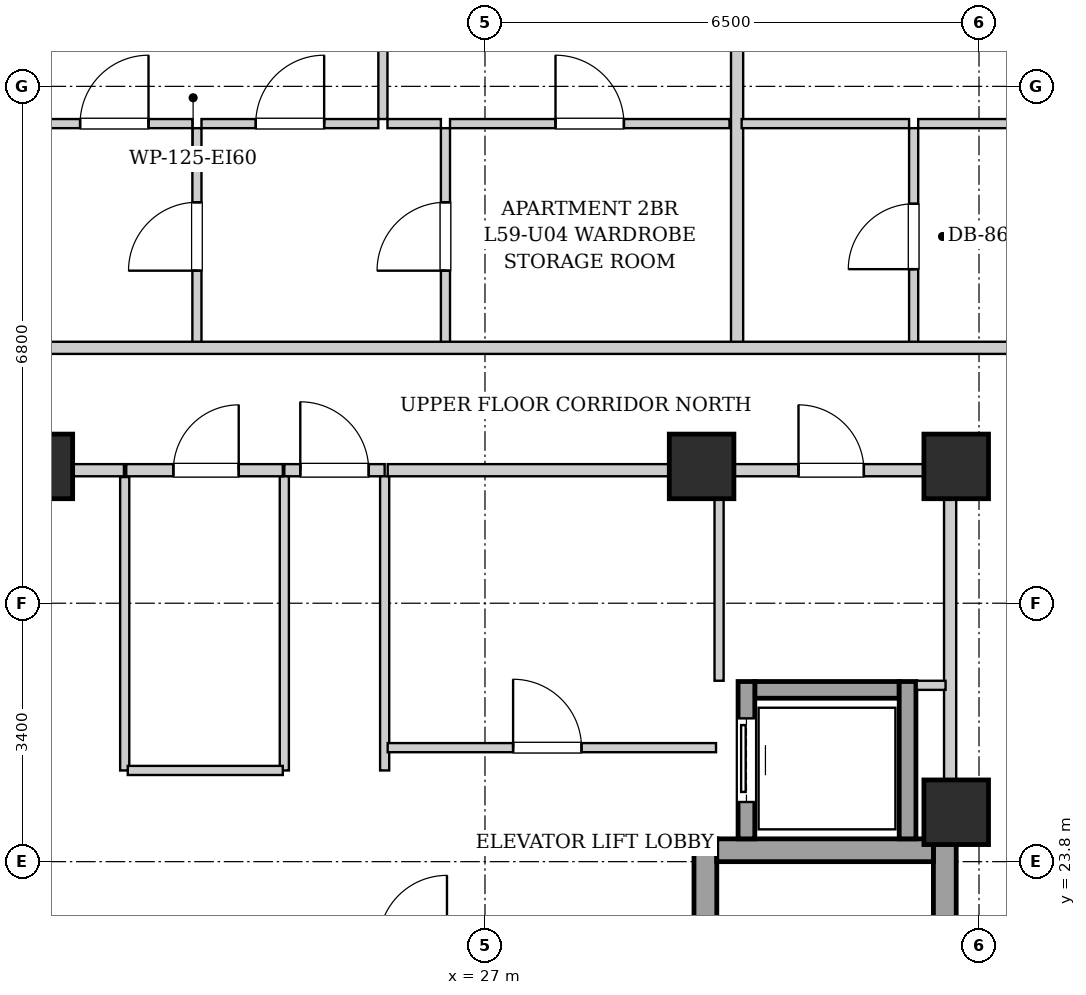
"""IFC4 building model, lengths in metres.
Left out: names, types, materials, properties, quantities, classifications, styles, units other than length and angle.
Written with IfcOpenShell. Run it as: python <this file> out.ifc"""

import sys

from ifc_helpers import new_model, si_unit, direction, frame, frame_2d, origin, origin_2d, place, context, subcontext, project, spatial, rectangle, extrude, element, fill, save


model = new_model("IFC4")
c1 = context("Model", 3, precision=1e-05, world=origin(), true_north=direction((0.0, 1.0)))
c2 = subcontext(c1, "Body", "Model", "MODEL_VIEW")
j1 = project(units=[si_unit("LENGTHUNIT", "METRE"), si_unit("PLANEANGLEUNIT", "RADIAN")], contexts=[c1])
p1 = place(None, origin())
s1 = spatial("IfcSite", under=j1, at=p1, CompositionType="ELEMENT")
p2 = place(p1, origin())
s2 = spatial("IfcBuilding", under=s1, at=p2, CompositionType="ELEMENT")
p3 = place(p2, frame((0.0, 0.0, 204.1)))
s3 = spatial("IfcBuildingStorey", under=s2, at=p3, CompositionType="ELEMENT", Elevation=204.1)
for number, where, z_axis, x_axis in (
    (1, (21.15, 29.0, 0.0), (0.0, 0.0, 1.0), (1.0, 0.0, 0.0)),
    (2, (29.85, 29.0, 0.0), (0.0, 0.0, 1.0), (1.0, 0.0, 0.0)),
    (3, (33.2, 29.0, 0.0), (0.0, 0.0, 1.0), (1.0, 0.0, 0.0)),
    (4, (33.2, 24.45, 0.0), (0.0, 0.0, 1.0), (1.0, 0.0, 0.0)),
):
    element("IfcColumn", number, at=place(p3, frame(where, z_axis=z_axis, x_axis=x_axis)), inside=s3, PredefinedType="COLUMN", context=c2, shape_type="SweptSolid", body=[
        extrude(rectangle(XDim=0.85, YDim=0.85, at=origin_2d()), origin(), (0.0, 0.0, 1.0), 3.3),
    ])
for number, where, z_axis, x_axis in (
    (5, (29.9, 15.1, 0.0), (0.0, 0.0, 1.0), (0.0, 1.0, 0.0)),
    (6, (33.05, 15.1, 0.0), (0.0, 0.0, 1.0), (0.0, 1.0, 0.0)),
):
    element("IfcWall", number, at=place(p3, frame(where, z_axis=z_axis, x_axis=x_axis)), inside=s3, PredefinedType="SHEAR", context=c2, shape_type="SweptSolid", body=[
        extrude(rectangle(XDim=9.0, YDim=0.3, at=frame_2d((4.5, 0.0))), origin(), (0.0, 0.0, 1.0), 3.04),
    ])
p4 = place(p3, frame((30.05, 23.95, 0.0), z_axis=(0.0, 0.0, 1.0), x_axis=(1.0, 0.0, 0.0)))
e7 = element("IfcWall", 7, at=p4, inside=s3, PredefinedType="SHEAR", context=c2, shape_type="SweptSolid", body=[
    extrude(rectangle(XDim=2.85, YDim=0.3, at=frame_2d((1.425, 0.0))), origin(), (0.0, 0.0, 1.0), 3.04),
])
p5 = place(p3, frame((30.55, 26.06, 0.0), z_axis=(0.0, 0.0, 1.0), x_axis=(1.0, 0.0, 0.0)))
e8 = element("IfcWall", 8, at=p5, inside=s3, PredefinedType="SHEAR", context=c2, shape_type="SweptSolid", body=[
    extrude(rectangle(XDim=1.9, YDim=0.22, at=frame_2d((0.95, 0.0))), origin(), (0.0, 0.0, 1.0), 3.04),
])
p6 = place(p3, frame((30.44, 24.1, 0.0), z_axis=(0.0, 0.0, 1.0), x_axis=(0.0, 1.0, 0.0)))
e9 = element("IfcWall", 9, at=p6, inside=s3, PredefinedType="SHEAR", context=c2, shape_type="SweptSolid", body=[
    extrude(rectangle(XDim=2.07, YDim=0.22, at=frame_2d((1.035, 0.0))), origin(), (0.0, 0.0, 1.0), 3.04),
])
p7 = place(p6, frame((0.485, 0.0, 0.0)))
e10 = element("IfcOpeningElement", 10, at=p7, cuts=e9, PredefinedType="OPENING", context=c2, shape_type="SweptSolid", body=[
    extrude(rectangle(XDim=1.1, YDim=2.15, at=frame_2d((0.55, 1.075))), frame((0.0, 0.12, 0.0), z_axis=(0.0, -1.0, 0.0), x_axis=(1.0, 0.0, 0.0)), (0.0, 0.0, 1.0), 0.24),
])
p8 = place(p3, frame((32.56, 24.1, 0.0), z_axis=(0.0, 0.0, 1.0), x_axis=(0.0, 1.0, 0.0)))
e11 = element("IfcWall", 11, at=p8, inside=s3, PredefinedType="SHEAR", context=c2, shape_type="SweptSolid", body=[
    extrude(rectangle(XDim=2.07, YDim=0.22, at=frame_2d((1.035, 0.0))), origin(), (0.0, 0.0, 1.0), 3.04),
])
p9 = place(p3, frame((33.12, 24.12, 0.0), z_axis=(0.0, 0.0, 1.0), x_axis=(0.0, 1.0, 0.0)))
e12 = element("IfcWall", 12, at=p9, inside=s3, PredefinedType="PARTITIONING", context=c2, shape_type="SweptSolid", body=[
    extrude(rectangle(XDim=4.76, YDim=0.16, at=frame_2d((2.38, 0.0))), origin(), (0.0, 0.0, 1.0), 3.04),
])
p10 = place(p3, frame((24.36, 28.95, 0.0), z_axis=(0.0, 0.0, 1.0), x_axis=(1.0, 0.0, 0.0)))
e13 = element("IfcWall", 13, at=p10, inside=s3, PredefinedType="PARTITIONING", context=c2, shape_type="SweptSolid", body=[
    extrude(rectangle(XDim=1.32, YDim=0.16, at=frame_2d((0.66, 0.0))), origin(), (0.0, 0.0, 1.0), 2.556),
])
p11 = place(p10, frame((0.21, 0.0, 0.0)))
e14 = element("IfcOpeningElement", 14, at=p11, cuts=e13, PredefinedType="OPENING", context=c2, shape_type="SweptSolid", body=[
    extrude(rectangle(XDim=0.9, YDim=2.05, at=frame_2d((0.45, 1.025))), frame((0.0, 0.09, 0.0), z_axis=(0.0, -1.0, 0.0), x_axis=(1.0, 0.0, 0.0)), (0.0, 0.0, 1.0), 0.18),
])
p12 = place(p3, frame((17.96, 28.95, 0.0), z_axis=(0.0, 0.0, 1.0), x_axis=(1.0, 0.0, 0.0)))
e15 = element("IfcWall", 15, at=p12, inside=s3, PredefinedType="PARTITIONING", context=c2, shape_type="SweptSolid", body=[
    extrude(rectangle(XDim=4.29, YDim=0.16, at=frame_2d((2.145, 0.0))), origin(), (0.0, 0.0, 1.0), 2.556),
])
p13 = place(p12, frame((1.715, 0.0, 0.0)))
e16 = element("IfcOpeningElement", 16, at=p13, cuts=e15, PredefinedType="OPENING", context=c2, shape_type="SweptSolid", body=[
    extrude(rectangle(XDim=0.86, YDim=2.05, at=frame_2d((0.43, 1.025))), frame((0.0, 0.09, 0.0), z_axis=(0.0, -1.0, 0.0), x_axis=(1.0, 0.0, 0.0)), (0.0, 0.0, 1.0), 0.18),
])
for number, where, z_axis, x_axis in (
    (17, (24.36, 25.0, 0.0), (0.0, 0.0, 1.0), (0.0, 1.0, 0.0)),
    (18, (25.68, 25.0, 0.0), (0.0, 0.0, 1.0), (0.0, 1.0, 0.0)),
):
    element("IfcWall", number, at=place(p3, frame(where, z_axis=z_axis, x_axis=x_axis)), inside=s3, PredefinedType="PARTITIONING", context=c2, shape_type="SweptSolid", body=[
        extrude(rectangle(XDim=3.87, YDim=0.12, at=frame_2d((1.935, 0.0))), origin(), (0.0, 0.0, 1.0), 3.04),
    ])
p14 = place(p3, frame((30.08, 26.18, 0.0), z_axis=(0.0, 0.0, 1.0), x_axis=(0.0, 1.0, 0.0)))
e19 = element("IfcWall", 19, at=p14, inside=s3, PredefinedType="PARTITIONING", context=c2, shape_type="SweptSolid", body=[
    extrude(rectangle(XDim=2.68, YDim=0.12, at=frame_2d((1.34, 0.0))), origin(), (0.0, 0.0, 1.0), 3.04),
])
p15 = place(p3, frame((32.68, 26.12, 0.0), z_axis=(0.0, 0.0, 1.0), x_axis=(1.0, 0.0, 0.0)))
e20 = element("IfcWall", 20, at=p15, inside=s3, PredefinedType="PARTITIONING", context=c2, shape_type="SweptSolid", body=[
    extrude(rectangle(XDim=0.38, YDim=0.12, at=frame_2d((0.19, 0.0))), origin(), (0.0, 0.0, 1.0), 3.04),
])
p16 = place(p3, frame((30.08, 28.95, 0.0), z_axis=(0.0, 0.0, 1.0), x_axis=(1.0, 0.0, 0.0)))
e21 = element("IfcWall", 21, at=p16, inside=s3, PredefinedType="PARTITIONING", context=c2, shape_type="SweptSolid", body=[
    extrude(rectangle(XDim=2.96, YDim=0.16, at=frame_2d((1.48, 0.0))), origin(), (0.0, 0.0, 1.0), 3.04),
])
p17 = place(p16, frame((1.045, 0.0, 0.0)))
e22 = element("IfcOpeningElement", 22, at=p17, cuts=e21, PredefinedType="OPENING", context=c2, shape_type="SweptSolid", body=[
    extrude(rectangle(XDim=0.86, YDim=2.05, at=frame_2d((0.43, 1.025))), frame((0.0, 0.09, 0.0), z_axis=(0.0, -1.0, 0.0), x_axis=(1.0, 0.0, 0.0)), (0.0, 0.0, 1.0), 0.18),
])
p18 = place(p3, frame((22.26, 25.0, 0.0), z_axis=(0.0, 0.0, 1.0), x_axis=(0.0, 1.0, 0.0)))
e23 = element("IfcWall", 23, at=p18, inside=s3, PredefinedType="PARTITIONING", context=c2, shape_type="SweptSolid", body=[
    extrude(rectangle(XDim=3.86, YDim=0.12, at=frame_2d((1.93, 0.0))), origin(), (0.0, 0.0, 1.0), 3.04),
])
p19 = place(p3, frame((22.3, 25.0, 0.0), z_axis=(0.0, 0.0, 1.0), x_axis=(1.0, 0.0, 0.0)))
e24 = element("IfcWall", 24, at=p19, inside=s3, PredefinedType="PARTITIONING", context=c2, shape_type="SweptSolid", body=[
    extrude(rectangle(XDim=2.04, YDim=0.12, at=frame_2d((1.02, 0.0))), origin(), (0.0, 0.0, 1.0), 3.04),
])
p20 = place(p3, frame((22.28, 28.95, 0.0), z_axis=(0.0, 0.0, 1.0), x_axis=(1.0, 0.0, 0.0)))
e25 = element("IfcWall", 25, at=p20, inside=s3, PredefinedType="PARTITIONING", context=c2, shape_type="SweptSolid", body=[
    extrude(rectangle(XDim=2.06, YDim=0.16, at=frame_2d((1.03, 0.0))), origin(), (0.0, 0.0, 1.0), 2.556),
])
p21 = place(p20, frame((0.62, 0.0, 0.0)))
e26 = element("IfcOpeningElement", 26, at=p21, cuts=e25, PredefinedType="OPENING", context=c2, shape_type="SweptSolid", body=[
    extrude(rectangle(XDim=0.86, YDim=2.05, at=frame_2d((0.43, 1.025))), frame((0.0, 0.09, 0.0), z_axis=(0.0, -1.0, 0.0), x_axis=(1.0, 0.0, 0.0)), (0.0, 0.0, 1.0), 0.18),
])
p22 = place(p3, frame((25.72, 28.95, 0.0), z_axis=(0.0, 0.0, 1.0), x_axis=(1.0, 0.0, 0.0)))
e27 = element("IfcWall", 27, at=p22, inside=s3, PredefinedType="PARTITIONING", context=c2, shape_type="SweptSolid", body=[
    extrude(rectangle(XDim=4.32, YDim=0.16, at=frame_2d((2.16, 0.0))), origin(), (0.0, 0.0, 1.0), 2.556),
])
p23 = place(p3, frame((25.72, 25.3, 0.0), z_axis=(0.0, 0.0, 1.0), x_axis=(1.0, 0.0, 0.0)))
e28 = element("IfcWall", 28, at=p23, inside=s3, PredefinedType="PARTITIONING", context=c2, shape_type="SweptSolid", body=[
    extrude(rectangle(XDim=4.32, YDim=0.12, at=frame_2d((2.16, 0.0))), origin(), (0.0, 0.0, 1.0), 3.04),
])
p24 = place(p23, frame((1.65, 0.0, 0.0)))
e29 = element("IfcOpeningElement", 29, at=p24, cuts=e28, PredefinedType="OPENING", context=c2, shape_type="SweptSolid", body=[
    extrude(rectangle(XDim=0.9, YDim=2.05, at=frame_2d((0.45, 1.025))), frame((0.0, 0.07, 0.0), z_axis=(0.0, -1.0, 0.0), x_axis=(1.0, 0.0, 0.0)), (0.0, 0.0, 1.0), 0.14),
])
p25 = place(p3, frame((23.21, 30.6, 0.0), z_axis=(0.0, 0.0, 1.0), x_axis=(0.0, 1.0, 0.0)))
e30 = element("IfcWall", 30, at=p25, inside=s3, PredefinedType="PARTITIONING", context=c2, shape_type="SweptSolid", body=[
    extrude(rectangle(XDim=2.85, YDim=0.12, at=frame_2d((1.425, 0.0))), origin(), (0.0, 0.0, 1.0), 3.04),
])
p26 = place(p25, frame((0.975, 0.0, 0.0)))
e31 = element("IfcOpeningElement", 31, at=p26, cuts=e30, PredefinedType="OPENING", context=c2, shape_type="SweptSolid", body=[
    extrude(rectangle(XDim=0.9, YDim=2.05, at=frame_2d((0.45, 1.025))), frame((0.0, 0.07, 0.0), z_axis=(0.0, -1.0, 0.0), x_axis=(1.0, 0.0, 0.0)), (0.0, 0.0, 1.0), 0.14),
])
p27 = place(p3, frame((21.097, 33.51, 0.0), z_axis=(0.0, 0.0, 1.0), x_axis=(1.0, 0.0, 0.0)))
e32 = element("IfcWall", 32, at=p27, inside=s3, PredefinedType="PARTITIONING", context=c2, shape_type="SweptSolid", body=[
    extrude(rectangle(XDim=2.053, YDim=0.12, at=frame_2d((1.026, 0.0))), origin(), (0.0, 0.0, 1.0), 3.04),
])
p28 = place(p27, frame((0.576, 0.0, 0.0)))
e33 = element("IfcOpeningElement", 33, at=p28, cuts=e32, PredefinedType="OPENING", context=c2, shape_type="SweptSolid", body=[
    extrude(rectangle(XDim=0.9, YDim=2.05, at=frame_2d((0.45, 1.025))), frame((0.0, 0.07, 0.0), z_axis=(0.0, -1.0, 0.0), x_axis=(1.0, 0.0, 0.0)), (0.0, 0.0, 1.0), 0.14),
])
p29 = place(p3, frame((26.48, 30.6, 0.0), z_axis=(0.0, 0.0, 1.0), x_axis=(0.0, 1.0, 0.0)))
e34 = element("IfcWall", 34, at=p29, inside=s3, PredefinedType="PARTITIONING", context=c2, shape_type="SweptSolid", body=[
    extrude(rectangle(XDim=2.85, YDim=0.12, at=frame_2d((1.425, 0.0))), origin(), (0.0, 0.0, 1.0), 3.04),
])
p30 = place(p29, frame((0.975, 0.0, 0.0)))
e35 = element("IfcOpeningElement", 35, at=p30, cuts=e34, PredefinedType="OPENING", context=c2, shape_type="SweptSolid", body=[
    extrude(rectangle(XDim=0.9, YDim=2.05, at=frame_2d((0.45, 1.025))), frame((0.0, 0.07, 0.0), z_axis=(0.0, -1.0, 0.0), x_axis=(1.0, 0.0, 0.0)), (0.0, 0.0, 1.0), 0.14),
])
p31 = place(p3, frame((23.27, 33.51, 0.0), z_axis=(0.0, 0.0, 1.0), x_axis=(1.0, 0.0, 0.0)))
e36 = element("IfcWall", 36, at=p31, inside=s3, PredefinedType="PARTITIONING", context=c2, shape_type="SweptSolid", body=[
    extrude(rectangle(XDim=2.327, YDim=0.12, at=frame_2d((1.164, 0.0))), origin(), (0.0, 0.0, 1.0), 3.04),
])
p32 = place(p31, frame((0.714, 0.0, 0.0)))
e37 = element("IfcOpeningElement", 37, at=p32, cuts=e36, PredefinedType="OPENING", context=c2, shape_type="SweptSolid", body=[
    extrude(rectangle(XDim=0.9, YDim=2.05, at=frame_2d((0.45, 1.025))), frame((0.0, 0.07, 0.0), z_axis=(0.0, -1.0, 0.0), x_axis=(1.0, 0.0, 0.0)), (0.0, 0.0, 1.0), 0.14),
])
p33 = place(p3, frame((25.717, 33.51, 0.0), z_axis=(0.0, 0.0, 1.0), x_axis=(1.0, 0.0, 0.0)))
e38 = element("IfcWall", 38, at=p33, inside=s3, PredefinedType="PARTITIONING", context=c2, shape_type="SweptSolid", body=[
    extrude(rectangle(XDim=0.703, YDim=0.12, at=frame_2d((0.352, 0.0))), origin(), (0.0, 0.0, 1.0), 3.04),
])
p34 = place(p3, frame((26.54, 33.51, 0.0), z_axis=(0.0, 0.0, 1.0), x_axis=(1.0, 0.0, 0.0)))
e39 = element("IfcWall", 39, at=p34, inside=s3, PredefinedType="PARTITIONING", context=c2, shape_type="SweptSolid", body=[
    extrude(rectangle(XDim=3.677, YDim=0.12, at=frame_2d((1.838, 0.0))), origin(), (0.0, 0.0, 1.0), 3.04),
])
p35 = place(p34, frame((1.388, 0.0, 0.0)))
e40 = element("IfcOpeningElement", 40, at=p35, cuts=e39, PredefinedType="OPENING", context=c2, shape_type="SweptSolid", body=[
    extrude(rectangle(XDim=0.9, YDim=2.05, at=frame_2d((0.45, 1.025))), frame((0.0, 0.07, 0.0), z_axis=(0.0, -1.0, 0.0), x_axis=(1.0, 0.0, 0.0)), (0.0, 0.0, 1.0), 0.14),
])
p36 = place(p3, frame((25.657, 33.57, 0.0), z_axis=(0.0, 0.0, 1.0), x_axis=(0.0, 1.0, 0.0)))
e41 = element("IfcWall", 41, at=p36, inside=s3, PredefinedType="PARTITIONING", context=c2, shape_type="SweptSolid", body=[
    extrude(rectangle(XDim=6.35, YDim=0.12, at=frame_2d((3.175, 0.0))), origin(), (0.0, 0.0, 1.0), 3.04),
])
p37 = place(p36, frame((2.71, 0.0, 0.0)))
e42 = element("IfcOpeningElement", 42, at=p37, cuts=e41, PredefinedType="OPENING", context=c2, shape_type="SweptSolid", body=[
    extrude(rectangle(XDim=0.9, YDim=2.05, at=frame_2d((0.45, 1.025))), frame((0.0, 0.07, 0.0), z_axis=(0.0, -1.0, 0.0), x_axis=(1.0, 0.0, 0.0)), (0.0, 0.0, 1.0), 0.14),
])
p38 = place(p3, frame((30.317, 30.6, 0.0), z_axis=(0.0, 0.0, 1.0), x_axis=(0.0, 1.0, 0.0)))
e43 = element("IfcWall", 43, at=p38, inside=s3, PredefinedType="PARTITIONING", context=c2, shape_type="SweptSolid", body=[
    extrude(rectangle(XDim=9.32, YDim=0.16, at=frame_2d((4.66, 0.0))), origin(), (0.0, 0.0, 1.0), 3.04),
])
p39 = place(p3, frame((32.64, 30.6, 0.0), z_axis=(0.0, 0.0, 1.0), x_axis=(0.0, 1.0, 0.0)))
e44 = element("IfcWall", 44, at=p39, inside=s3, PredefinedType="PARTITIONING", context=c2, shape_type="SweptSolid", body=[
    extrude(rectangle(XDim=2.85, YDim=0.12, at=frame_2d((1.425, 0.0))), origin(), (0.0, 0.0, 1.0), 3.04),
])
p40 = place(p39, frame((0.995, 0.0, 0.0)))
e45 = element("IfcOpeningElement", 45, at=p40, cuts=e44, PredefinedType="OPENING", context=c2, shape_type="SweptSolid", body=[
    extrude(rectangle(XDim=0.86, YDim=2.05, at=frame_2d((0.43, 1.025))), frame((0.0, 0.07, 0.0), z_axis=(0.0, -1.0, 0.0), x_axis=(1.0, 0.0, 0.0)), (0.0, 0.0, 1.0), 0.14),
])
p41 = place(p3, frame((30.377, 33.51, 0.0), z_axis=(0.0, 0.0, 1.0), x_axis=(1.0, 0.0, 0.0)))
e46 = element("IfcWall", 46, at=p41, inside=s3, PredefinedType="PARTITIONING", context=c2, shape_type="SweptSolid", body=[
    extrude(rectangle(XDim=2.203, YDim=0.12, at=frame_2d((1.102, 0.0))), origin(), (0.0, 0.0, 1.0), 3.04),
])
p42 = place(p3, frame((32.7, 33.51, 0.0), z_axis=(0.0, 0.0, 1.0), x_axis=(1.0, 0.0, 0.0)))
e47 = element("IfcWall", 47, at=p42, inside=s3, PredefinedType="PARTITIONING", context=c2, shape_type="SweptSolid", body=[
    extrude(rectangle(XDim=5.02, YDim=0.12, at=frame_2d((2.51, 0.0))), origin(), (0.0, 0.0, 1.0), 3.04),
])
p43 = place(p42, frame((2.06, 0.0, 0.0)))
e48 = element("IfcOpeningElement", 48, at=p43, cuts=e47, PredefinedType="OPENING", context=c2, shape_type="SweptSolid", body=[
    extrude(rectangle(XDim=0.9, YDim=2.05, at=frame_2d((0.45, 1.025))), frame((0.0, 0.07, 0.0), z_axis=(0.0, -1.0, 0.0), x_axis=(1.0, 0.0, 0.0)), (0.0, 0.0, 1.0), 0.14),
])
p44 = place(p3, frame((13.15, 30.56, 0.0), z_axis=(0.0, 0.0, 1.0), x_axis=(1.0, 0.0, 0.0)))
e49 = element("IfcWall", 49, at=p44, inside=s3, PredefinedType="PARTITIONING", context=c2, shape_type="SweptSolid", body=[
    extrude(rectangle(XDim=24.6, YDim=0.16, at=frame_2d((12.3, 0.0))), origin(), (0.0, 0.0, 1.0), 3.04),
])
p45 = place(p44, frame((3.115, 0.0, 0.0)))
e50 = element("IfcOpeningElement", 50, at=p45, cuts=e49, PredefinedType="OPENING", context=c2, shape_type="SweptSolid", body=[
    extrude(rectangle(XDim=0.95, YDim=2.1, at=frame_2d((0.475, 1.05))), frame((0.0, 0.09, 0.0), z_axis=(0.0, -1.0, 0.0), x_axis=(1.0, 0.0, 0.0)), (0.0, 0.0, 1.0), 0.18),
])
p46 = place(p44, frame((21.55, 0.0, 0.0)))
e51 = element("IfcOpeningElement", 51, at=p46, cuts=e49, PredefinedType="OPENING", context=c2, shape_type="SweptSolid", body=[
    extrude(rectangle(XDim=0.95, YDim=2.1, at=frame_2d((0.475, 1.05))), frame((0.0, 0.09, 0.0), z_axis=(0.0, -1.0, 0.0), x_axis=(1.0, 0.0, 0.0)), (0.0, 0.0, 1.0), 0.18),
])
p47 = place(p7, origin())
e52 = element("IfcDoor", 52, at=p47, inside=s3, OperationType="SLIDING_TO_LEFT", PredefinedType="DOOR", context=c2, shape_type="SweptSolid", body=[
    extrude(rectangle(XDim=1.1, YDim=2.15, at=frame_2d((0.55, 1.075))), frame((0.0, 0.025, 0.0), z_axis=(0.0, -1.0, 0.0), x_axis=(1.0, 0.0, 0.0)), (0.0, 0.0, 1.0), 0.05),
])
fill(e10, e52)
p48 = place(p11, origin())
e53 = element("IfcDoor", 53, at=p48, inside=s3, OperationType="SINGLE_SWING_LEFT", PredefinedType="DOOR", context=c2, shape_type="SweptSolid", body=[
    extrude(rectangle(XDim=0.9, YDim=2.05, at=frame_2d((0.45, 1.025))), frame((0.0, 0.025, 0.0), z_axis=(0.0, -1.0, 0.0), x_axis=(1.0, 0.0, 0.0)), (0.0, 0.0, 1.0), 0.05),
])
fill(e14, e53)
p49 = place(p17, origin())
e54 = element("IfcDoor", 54, at=p49, inside=s3, OperationType="SINGLE_SWING_LEFT", PredefinedType="DOOR", context=c2, shape_type="SweptSolid", body=[
    extrude(rectangle(XDim=0.86, YDim=2.05, at=frame_2d((0.43, 1.025))), frame((0.0, 0.025, 0.0), z_axis=(0.0, -1.0, 0.0), x_axis=(1.0, 0.0, 0.0)), (0.0, 0.0, 1.0), 0.05),
])
fill(e22, e54)
p50 = place(p21, origin())
e55 = element("IfcDoor", 55, at=p50, inside=s3, OperationType="SINGLE_SWING_RIGHT", PredefinedType="DOOR", context=c2, shape_type="SweptSolid", body=[
    extrude(rectangle(XDim=0.86, YDim=2.05, at=frame_2d((0.43, 1.025))), frame((0.0, 0.025, 0.0), z_axis=(0.0, -1.0, 0.0), x_axis=(1.0, 0.0, 0.0)), (0.0, 0.0, 1.0), 0.05),
])
fill(e26, e55)
p51 = place(p24, origin())
e56 = element("IfcDoor", 56, at=p51, inside=s3, OperationType="SINGLE_SWING_LEFT", PredefinedType="DOOR", context=c2, shape_type="SweptSolid", body=[
    extrude(rectangle(XDim=0.9, YDim=2.05, at=frame_2d((0.45, 1.025))), frame((0.0, 0.025, 0.0), z_axis=(0.0, -1.0, 0.0), x_axis=(1.0, 0.0, 0.0)), (0.0, 0.0, 1.0), 0.05),
])
fill(e29, e56)
p52 = place(p26, origin())
e57 = element("IfcDoor", 57, at=p52, inside=s3, OperationType="SINGLE_SWING_LEFT", PredefinedType="DOOR", context=c2, shape_type="SweptSolid", body=[
    extrude(rectangle(XDim=0.9, YDim=2.05, at=frame_2d((0.45, 1.025))), frame((0.0, 0.025, 0.0), z_axis=(0.0, -1.0, 0.0), x_axis=(1.0, 0.0, 0.0)), (0.0, 0.0, 1.0), 0.05),
])
fill(e31, e57)
p53 = place(p28, origin())
e58 = element("IfcDoor", 58, at=p53, inside=s3, OperationType="SINGLE_SWING_RIGHT", PredefinedType="DOOR", context=c2, shape_type="SweptSolid", body=[
    extrude(rectangle(XDim=0.9, YDim=2.05, at=frame_2d((0.45, 1.025))), frame((0.0, 0.025, 0.0), z_axis=(0.0, -1.0, 0.0), x_axis=(1.0, 0.0, 0.0)), (0.0, 0.0, 1.0), 0.05),
])
fill(e33, e58)
p54 = place(p30, origin())
e59 = element("IfcDoor", 59, at=p54, inside=s3, OperationType="SINGLE_SWING_LEFT", PredefinedType="DOOR", context=c2, shape_type="SweptSolid", body=[
    extrude(rectangle(XDim=0.9, YDim=2.05, at=frame_2d((0.45, 1.025))), frame((0.0, 0.025, 0.0), z_axis=(0.0, -1.0, 0.0), x_axis=(1.0, 0.0, 0.0)), (0.0, 0.0, 1.0), 0.05),
])
fill(e35, e59)
p55 = place(p32, origin())
e60 = element("IfcDoor", 60, at=p55, inside=s3, OperationType="SINGLE_SWING_RIGHT", PredefinedType="DOOR", context=c2, shape_type="SweptSolid", body=[
    extrude(rectangle(XDim=0.9, YDim=2.05, at=frame_2d((0.45, 1.025))), frame((0.0, 0.025, 0.0), z_axis=(0.0, -1.0, 0.0), x_axis=(1.0, 0.0, 0.0)), (0.0, 0.0, 1.0), 0.05),
])
fill(e37, e60)
p56 = place(p35, origin())
e61 = element("IfcDoor", 61, at=p56, inside=s3, OperationType="SINGLE_SWING_LEFT", PredefinedType="DOOR", context=c2, shape_type="SweptSolid", body=[
    extrude(rectangle(XDim=0.9, YDim=2.05, at=frame_2d((0.45, 1.025))), frame((0.0, 0.025, 0.0), z_axis=(0.0, -1.0, 0.0), x_axis=(1.0, 0.0, 0.0)), (0.0, 0.0, 1.0), 0.05),
])
fill(e40, e61)
p57 = place(p40, origin())
e62 = element("IfcDoor", 62, at=p57, inside=s3, OperationType="SINGLE_SWING_LEFT", PredefinedType="DOOR", context=c2, shape_type="SweptSolid", body=[
    extrude(rectangle(XDim=0.86, YDim=2.05, at=frame_2d((0.43, 1.025))), frame((0.0, 0.025, 0.0), z_axis=(0.0, -1.0, 0.0), x_axis=(1.0, 0.0, 0.0)), (0.0, 0.0, 1.0), 0.05),
])
fill(e45, e62)
save(model, sys.argv[1])
